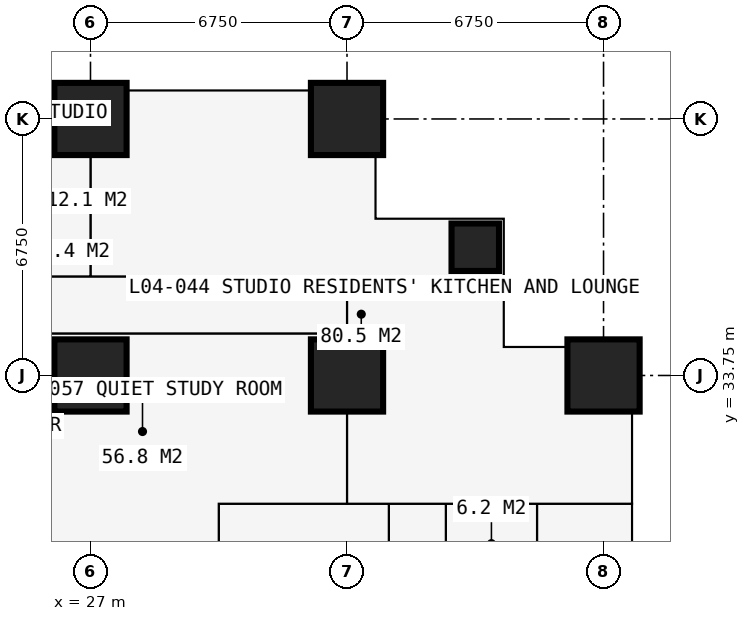
"""IFC4 building model, lengths in metres.
Left out: names, types, materials, properties, quantities, classifications, styles, units other than length and angle.
Written with IfcOpenShell. Run it as: python <this file> out.ifc"""

import sys

from ifc_helpers import new_model, si_unit, direction, frame, frame_2d, origin, origin_2d, place, context, subcontext, project, spatial, rectangle, extrude, element, fill, save


model = new_model("IFC4")
c1 = context("Model", 3, precision=1e-05, world=origin(), true_north=direction((0.0, 1.0)))
c2 = subcontext(c1, "Body", "Model", "MODEL_VIEW")
j1 = project(units=[si_unit("LENGTHUNIT", "METRE"), si_unit("PLANEANGLEUNIT", "RADIAN")], contexts=[c1])
p1 = place(None, origin())
s1 = spatial("IfcSite", under=j1, at=p1, CompositionType="ELEMENT")
p2 = place(p1, origin())
s2 = spatial("IfcBuilding", under=s1, at=p2, CompositionType="ELEMENT")
p3 = place(p2, frame((0.0, 0.0, 18.0)))
s3 = spatial("IfcBuildingStorey", under=s2, at=p3, CompositionType="ELEMENT", Elevation=18.0)
for number, where, z_axis, x_axis in (
    (1, (27.0, 33.75, 0.0), (0.0, 0.0, 1.0), (1.0, 0.0, 0.0)),
    (2, (27.0, 40.5, 0.0), (0.0, 0.0, 1.0), (1.0, 0.0, 0.0)),
    (3, (33.75, 33.75, 0.0), (0.0, 0.0, 1.0), (1.0, 0.0, 0.0)),
    (4, (33.75, 40.5, 0.0), (0.0, 0.0, 1.0), (1.0, 0.0, 0.0)),
):
    element("IfcColumn", number, at=place(p3, frame(where, z_axis=z_axis, x_axis=x_axis)), inside=s3, PredefinedType="COLUMN", context=c2, shape_type="SweptSolid", body=[
        extrude(rectangle(XDim=1.9, YDim=1.9, at=origin_2d()), origin(), (0.0, 0.0, 1.0), 3.6),
    ])
p4 = place(p3, frame((37.125, 37.125, 0.0), z_axis=(0.0, 0.0, 1.0), x_axis=(1.0, 0.0, 0.0)))
e5 = element("IfcColumn", 5, at=p4, inside=s3, PredefinedType="COLUMN", context=c2, shape_type="SweptSolid", body=[
    extrude(rectangle(XDim=1.25, YDim=1.25, at=origin_2d()), origin(), (0.0, 0.0, 1.0), 3.6),
])
p5 = place(p3, frame((40.5, 33.75, 0.0), z_axis=(0.0, 0.0, 1.0), x_axis=(1.0, 0.0, 0.0)))
e6 = element("IfcColumn", 6, at=p5, inside=s3, PredefinedType="COLUMN", context=c2, shape_type="SweptSolid", body=[
    extrude(rectangle(XDim=1.9, YDim=1.9, at=origin_2d()), origin(), (0.0, 0.0, 1.0), 3.6),
])
p6 = place(p3, frame((41.25, 34.5, 0.0), z_axis=(0.0, 0.0, 1.0), x_axis=(-1.0, 0.0, 0.0)))
e7 = element("IfcWall", 7, at=p6, inside=s3, PredefinedType="SOLIDWALL", context=c2, shape_type="SweptSolid", body=[
    extrude(rectangle(XDim=3.375, YDim=0.3, at=frame_2d((1.688, 0.0))), origin(), (0.0, 0.0, 1.0), 3.375),
])
p7 = place(p6, frame((1.857, 0.0, 0.9)))
e8 = element("IfcOpeningElement", 8, at=p7, cuts=e7, PredefinedType="OPENING", context=c2, shape_type="SweptSolid", body=[
    extrude(rectangle(XDim=1.2, YDim=1.8, at=frame_2d((0.6, 0.9))), frame((0.0, 0.16, 0.0), z_axis=(0.0, -1.0, 0.0), x_axis=(1.0, 0.0, 0.0)), (0.0, 0.0, 1.0), 0.32),
])
p8 = place(p3, frame((37.875, 34.5, 0.0), z_axis=(0.0, 0.0, 1.0), x_axis=(0.0, 1.0, 0.0)))
e9 = element("IfcWall", 9, at=p8, inside=s3, PredefinedType="SOLIDWALL", context=c2, shape_type="SweptSolid", body=[
    extrude(rectangle(XDim=3.375, YDim=0.3, at=frame_2d((1.688, 0.0))), origin(), (0.0, 0.0, 1.0), 3.375),
])
p9 = place(p8, frame((0.788, 0.0, 0.6)))
e10 = element("IfcOpeningElement", 10, at=p9, cuts=e9, PredefinedType="OPENING", context=c2, shape_type="SweptSolid", body=[
    extrude(rectangle(XDim=1.8, YDim=2.1, at=frame_2d((0.9, 1.05))), frame((0.0, 0.16, 0.0), z_axis=(0.0, -1.0, 0.0), x_axis=(1.0, 0.0, 0.0)), (0.0, 0.0, 1.0), 0.32),
])
p10 = place(p3, frame((37.875, 37.875, 0.0), z_axis=(0.0, 0.0, 1.0), x_axis=(-1.0, 0.0, 0.0)))
e11 = element("IfcWall", 11, at=p10, inside=s3, PredefinedType="SOLIDWALL", context=c2, shape_type="SweptSolid", body=[
    extrude(rectangle(XDim=3.375, YDim=0.3, at=frame_2d((1.688, 0.0))), origin(), (0.0, 0.0, 1.0), 3.375),
])
p11 = place(p10, frame((0.788, 0.0, 0.6)))
e12 = element("IfcOpeningElement", 12, at=p11, cuts=e11, PredefinedType="OPENING", context=c2, shape_type="SweptSolid", body=[
    extrude(rectangle(XDim=1.8, YDim=2.1, at=frame_2d((0.9, 1.05))), frame((0.0, 0.16, 0.0), z_axis=(0.0, -1.0, 0.0), x_axis=(1.0, 0.0, 0.0)), (0.0, 0.0, 1.0), 0.32),
])
p12 = place(p3, frame((34.5, 37.875, 0.0), z_axis=(0.0, 0.0, 1.0), x_axis=(0.0, 1.0, 0.0)))
e13 = element("IfcWall", 13, at=p12, inside=s3, PredefinedType="SOLIDWALL", context=c2, shape_type="SweptSolid", body=[
    extrude(rectangle(XDim=3.375, YDim=0.3, at=frame_2d((1.688, 0.0))), origin(), (0.0, 0.0, 1.0), 3.375),
])
p13 = place(p12, frame((0.317, 0.0, 0.9)))
e14 = element("IfcOpeningElement", 14, at=p13, cuts=e13, PredefinedType="OPENING", context=c2, shape_type="SweptSolid", body=[
    extrude(rectangle(XDim=1.2, YDim=1.8, at=frame_2d((0.6, 0.9))), frame((0.0, 0.16, 0.0), z_axis=(0.0, -1.0, 0.0), x_axis=(1.0, 0.0, 0.0)), (0.0, 0.0, 1.0), 0.32),
])
p14 = place(p3, frame((10.125, 36.35, 0.0), z_axis=(0.0, 0.0, 1.0), x_axis=(1.0, 0.0, 0.0)))
e15 = element("IfcWall", 15, at=p14, inside=s3, PredefinedType="PARTITIONING", context=c2, shape_type="SweptSolid", body=[
    extrude(rectangle(XDim=23.625, YDim=0.1, at=frame_2d((11.812, 0.0))), origin(), (0.0, 0.0, 1.0), 3.375),
])
p15 = place(p14, frame((0.2, 0.0, 0.0)))
e16 = element("IfcOpeningElement", 16, at=p15, cuts=e15, PredefinedType="OPENING", context=c2, shape_type="SweptSolid", body=[
    extrude(rectangle(XDim=0.95, YDim=2.2, at=frame_2d((0.475, 1.1))), frame((0.0, 0.06, 0.0), z_axis=(0.0, -1.0, 0.0), x_axis=(1.0, 0.0, 0.0)), (0.0, 0.0, 1.0), 0.12),
])
p16 = place(p14, frame((3.625, 0.0, 0.0)))
e17 = element("IfcOpeningElement", 17, at=p16, cuts=e15, PredefinedType="OPENING", context=c2, shape_type="SweptSolid", body=[
    extrude(rectangle(XDim=0.95, YDim=2.2, at=frame_2d((0.475, 1.1))), frame((0.0, 0.06, 0.0), z_axis=(0.0, -1.0, 0.0), x_axis=(1.0, 0.0, 0.0)), (0.0, 0.0, 1.0), 0.12),
])
p17 = place(p14, frame((7.0, 0.0, 0.0)))
e18 = element("IfcOpeningElement", 18, at=p17, cuts=e15, PredefinedType="OPENING", context=c2, shape_type="SweptSolid", body=[
    extrude(rectangle(XDim=0.95, YDim=2.2, at=frame_2d((0.475, 1.1))), frame((0.0, 0.06, 0.0), z_axis=(0.0, -1.0, 0.0), x_axis=(1.0, 0.0, 0.0)), (0.0, 0.0, 1.0), 0.12),
])
p18 = place(p14, frame((10.375, 0.0, 0.0)))
e19 = element("IfcOpeningElement", 19, at=p18, cuts=e15, PredefinedType="OPENING", context=c2, shape_type="SweptSolid", body=[
    extrude(rectangle(XDim=0.95, YDim=2.2, at=frame_2d((0.475, 1.1))), frame((0.0, 0.06, 0.0), z_axis=(0.0, -1.0, 0.0), x_axis=(1.0, 0.0, 0.0)), (0.0, 0.0, 1.0), 0.12),
])
p19 = place(p14, frame((13.75, 0.0, 0.0)))
e20 = element("IfcOpeningElement", 20, at=p19, cuts=e15, PredefinedType="OPENING", context=c2, shape_type="SweptSolid", body=[
    extrude(rectangle(XDim=0.95, YDim=2.2, at=frame_2d((0.475, 1.1))), frame((0.0, 0.06, 0.0), z_axis=(0.0, -1.0, 0.0), x_axis=(1.0, 0.0, 0.0)), (0.0, 0.0, 1.0), 0.12),
])
p20 = place(p3, frame((22.988, 34.85, 0.0), z_axis=(0.0, 0.0, 1.0), x_axis=(1.0, 0.0, 0.0)))
e21 = element("IfcWall", 21, at=p20, inside=s3, PredefinedType="PARTITIONING", context=c2, shape_type="SweptSolid", body=[
    extrude(rectangle(XDim=10.762, YDim=0.15, at=frame_2d((5.381, 0.0))), origin(), (0.0, 0.0, 1.0), 3.375),
])
p21 = place(p20, frame((5.0, 0.0, 0.0)))
e22 = element("IfcOpeningElement", 22, at=p21, cuts=e21, PredefinedType="OPENING", context=c2, shape_type="SweptSolid", body=[
    extrude(rectangle(XDim=0.95, YDim=2.2, at=frame_2d((0.475, 1.1))), frame((0.0, 0.085, 0.0), z_axis=(0.0, -1.0, 0.0), x_axis=(1.0, 0.0, 0.0)), (0.0, 0.0, 1.0), 0.17),
])
p22 = place(p3, frame((25.0, 38.55, 0.0), z_axis=(0.0, 0.0, 1.0), x_axis=(1.0, 0.0, 0.0)))
e23 = element("IfcWall", 23, at=p22, inside=s3, PredefinedType="PARTITIONING", context=c2, shape_type="SweptSolid", body=[
    extrude(rectangle(XDim=2.0, YDim=0.1, at=frame_2d((1.0, 0.0))), origin(), (0.0, 0.0, 1.0), 3.375),
])
p23 = place(p3, frame((27.0, 36.35, 0.0), z_axis=(0.0, 0.0, 1.0), x_axis=(0.0, 1.0, 0.0)))
e24 = element("IfcWall", 24, at=p23, inside=s3, PredefinedType="PARTITIONING", context=c2, shape_type="SweptSolid", body=[
    extrude(rectangle(XDim=4.884, YDim=0.15, at=frame_2d((2.442, 0.0))), origin(), (0.0, 0.0, 1.0), 2.61),
])
p24 = place(p3, frame((30.375, 29.2, 0.0), z_axis=(0.0, 0.0, 1.0), x_axis=(0.0, 1.0, 0.0)))
e25 = element("IfcWall", 25, at=p24, inside=s3, PredefinedType="PARTITIONING", context=c2, shape_type="SweptSolid", body=[
    extrude(rectangle(XDim=1.175, YDim=0.15, at=frame_2d((0.587, 0.0))), origin(), (0.0, 0.0, 1.0), 3.375),
])
p25 = place(p3, frame((30.375, 30.375, 0.0), z_axis=(0.0, 0.0, 1.0), x_axis=(1.0, 0.0, 0.0)))
e26 = element("IfcWall", 26, at=p25, inside=s3, PredefinedType="PARTITIONING", context=c2, shape_type="SweptSolid", body=[
    extrude(rectangle(XDim=10.859, YDim=0.15, at=frame_2d((5.429, 0.0))), origin(), (0.0, 0.0, 1.0), 3.375),
])
p26 = place(p25, frame((4.725, 0.0, 0.0)))
e27 = element("IfcOpeningElement", 27, at=p26, cuts=e26, PredefinedType="OPENING", context=c2, shape_type="SweptSolid", body=[
    extrude(rectangle(XDim=1.0, YDim=2.2, at=frame_2d((0.5, 1.1))), frame((0.0, 0.085, 0.0), z_axis=(0.0, -1.0, 0.0), x_axis=(1.0, 0.0, 0.0)), (0.0, 0.0, 1.0), 0.17),
])
p27 = place(p3, frame((33.75, 30.375, 0.0), z_axis=(0.0, 0.0, 1.0), x_axis=(0.0, 1.0, 0.0)))
e28 = element("IfcWall", 28, at=p27, inside=s3, PredefinedType="PARTITIONING", context=c2, shape_type="SweptSolid", body=[
    extrude(rectangle(XDim=5.975, YDim=0.15, at=frame_2d((2.988, 0.0))), origin(), (0.0, 0.0, 1.0), 2.877),
])
p28 = place(p3, frame((34.85, 12.55, 0.0), z_axis=(0.0, 0.0, 1.0), x_axis=(0.0, 1.0, 0.0)))
e29 = element("IfcWall", 29, at=p28, inside=s3, PredefinedType="PARTITIONING", context=c2, shape_type="SweptSolid", body=[
    extrude(rectangle(XDim=17.825, YDim=0.15, at=frame_2d((8.913, 0.0))), origin(), (0.0, 0.0, 1.0), 3.375),
])
p29 = place(p28, frame((8.65, 0.0, 0.0)))
e30 = element("IfcOpeningElement", 30, at=p29, cuts=e29, PredefinedType="OPENING", context=c2, shape_type="SweptSolid", body=[
    extrude(rectangle(XDim=0.95, YDim=2.2, at=frame_2d((0.475, 1.1))), frame((0.0, 0.085, 0.0), z_axis=(0.0, -1.0, 0.0), x_axis=(1.0, 0.0, 0.0)), (0.0, 0.0, 1.0), 0.17),
])
p30 = place(p3, frame((36.35, 6.75, 0.0), z_axis=(0.0, 0.0, 1.0), x_axis=(0.0, 1.0, 0.0)))
e31 = element("IfcWall", 31, at=p30, inside=s3, PredefinedType="PARTITIONING", context=c2, shape_type="SweptSolid", body=[
    extrude(rectangle(XDim=23.625, YDim=0.15, at=frame_2d((11.812, 0.0))), origin(), (0.0, 0.0, 1.0), 3.375),
])
p31 = place(p30, frame((18.475, 0.0, 0.0)))
e32 = element("IfcOpeningElement", 32, at=p31, cuts=e31, PredefinedType="OPENING", context=c2, shape_type="SweptSolid", body=[
    extrude(rectangle(XDim=0.95, YDim=2.2, at=frame_2d((0.475, 1.1))), frame((0.0, 0.085, 0.0), z_axis=(0.0, -1.0, 0.0), x_axis=(1.0, 0.0, 0.0)), (0.0, 0.0, 1.0), 0.17),
])
p32 = place(p30, frame((11.725, 0.0, 0.0)))
e33 = element("IfcOpeningElement", 33, at=p32, cuts=e31, PredefinedType="OPENING", context=c2, shape_type="SweptSolid", body=[
    extrude(rectangle(XDim=0.95, YDim=2.2, at=frame_2d((0.475, 1.1))), frame((0.0, 0.085, 0.0), z_axis=(0.0, -1.0, 0.0), x_axis=(1.0, 0.0, 0.0)), (0.0, 0.0, 1.0), 0.17),
])
p33 = place(p30, frame((6.95, 0.0, 0.0)))
e34 = element("IfcOpeningElement", 34, at=p33, cuts=e31, PredefinedType="OPENING", context=c2, shape_type="SweptSolid", body=[
    extrude(rectangle(XDim=0.95, YDim=2.2, at=frame_2d((0.475, 1.1))), frame((0.0, 0.085, 0.0), z_axis=(0.0, -1.0, 0.0), x_axis=(1.0, 0.0, 0.0)), (0.0, 0.0, 1.0), 0.17),
])
p34 = place(p3, frame((38.75, 27.775, 0.0), z_axis=(0.0, 0.0, 1.0), x_axis=(0.0, 1.0, 0.0)))
e35 = element("IfcWall", 35, at=p34, inside=s3, PredefinedType="PARTITIONING", context=c2, shape_type="SweptSolid", body=[
    extrude(rectangle(XDim=2.6, YDim=0.1, at=frame_2d((1.3, 0.0))), origin(), (0.0, 0.0, 1.0), 3.375),
])
p35 = place(p34, frame((0.85, 0.0, 0.0)))
e36 = element("IfcOpeningElement", 36, at=p35, cuts=e35, PredefinedType="OPENING", context=c2, shape_type="SweptSolid", body=[
    extrude(rectangle(XDim=0.9, YDim=2.2, at=frame_2d((0.45, 1.1))), frame((0.0, 0.06, 0.0), z_axis=(0.0, -1.0, 0.0), x_axis=(1.0, 0.0, 0.0)), (0.0, 0.0, 1.0), 0.12),
])
p36 = place(p7, origin())
e37 = element("IfcWindow", 37, at=p36, inside=s3, PartitioningType="SINGLE_PANEL", PredefinedType="WINDOW", context=c2, shape_type="SweptSolid", body=[
    extrude(rectangle(XDim=1.2, YDim=1.8, at=frame_2d((0.6, 0.9))), frame((0.0, 0.03, 0.0), z_axis=(0.0, -1.0, 0.0), x_axis=(1.0, 0.0, 0.0)), (0.0, 0.0, 1.0), 0.06),
])
fill(e8, e37)
p37 = place(p9, origin())
e38 = element("IfcWindow", 38, at=p37, inside=s3, PartitioningType="SINGLE_PANEL", PredefinedType="WINDOW", context=c2, shape_type="SweptSolid", body=[
    extrude(rectangle(XDim=1.8, YDim=2.1, at=frame_2d((0.9, 1.05))), frame((0.0, 0.03, 0.0), z_axis=(0.0, -1.0, 0.0), x_axis=(1.0, 0.0, 0.0)), (0.0, 0.0, 1.0), 0.06),
])
fill(e10, e38)
p38 = place(p11, origin())
e39 = element("IfcWindow", 39, at=p38, inside=s3, PartitioningType="SINGLE_PANEL", PredefinedType="WINDOW", context=c2, shape_type="SweptSolid", body=[
    extrude(rectangle(XDim=1.8, YDim=2.1, at=frame_2d((0.9, 1.05))), frame((0.0, 0.03, 0.0), z_axis=(0.0, -1.0, 0.0), x_axis=(1.0, 0.0, 0.0)), (0.0, 0.0, 1.0), 0.06),
])
fill(e12, e39)
p39 = place(p13, origin())
e40 = element("IfcWindow", 40, at=p39, inside=s3, PartitioningType="SINGLE_PANEL", PredefinedType="WINDOW", context=c2, shape_type="SweptSolid", body=[
    extrude(rectangle(XDim=1.2, YDim=1.8, at=frame_2d((0.6, 0.9))), frame((0.0, 0.03, 0.0), z_axis=(0.0, -1.0, 0.0), x_axis=(1.0, 0.0, 0.0)), (0.0, 0.0, 1.0), 0.06),
])
fill(e14, e40)
p40 = place(p35, origin())
e41 = element("IfcDoor", 41, at=p40, inside=s3, OperationType="SINGLE_SWING_RIGHT", PredefinedType="DOOR", context=c2, shape_type="SweptSolid", body=[
    extrude(rectangle(XDim=0.9, YDim=2.2, at=frame_2d((0.45, 1.1))), frame((0.0, 0.025, 0.0), z_axis=(0.0, -1.0, 0.0), x_axis=(1.0, 0.0, 0.0)), (0.0, 0.0, 1.0), 0.05),
])
fill(e36, e41)
p41 = place(p26, origin())
e42 = element("IfcDoor", 42, at=p41, inside=s3, OperationType="SINGLE_SWING_LEFT", PredefinedType="DOOR", context=c2, shape_type="SweptSolid", body=[
    extrude(rectangle(XDim=1.0, YDim=2.2, at=frame_2d((0.5, 1.1))), frame((0.0, 0.025, 0.0), z_axis=(0.0, -1.0, 0.0), x_axis=(1.0, 0.0, 0.0)), (0.0, 0.0, 1.0), 0.05),
])
fill(e27, e42)
p42 = place(p21, origin())
e43 = element("IfcDoor", 43, at=p42, inside=s3, OperationType="SINGLE_SWING_LEFT", PredefinedType="DOOR", context=c2, shape_type="SweptSolid", body=[
    extrude(rectangle(XDim=0.95, YDim=2.2, at=frame_2d((0.475, 1.1))), frame((0.0, 0.025, 0.0), z_axis=(0.0, -1.0, 0.0), x_axis=(1.0, 0.0, 0.0)), (0.0, 0.0, 1.0), 0.05),
])
fill(e22, e43)
save(model, sys.argv[1])
